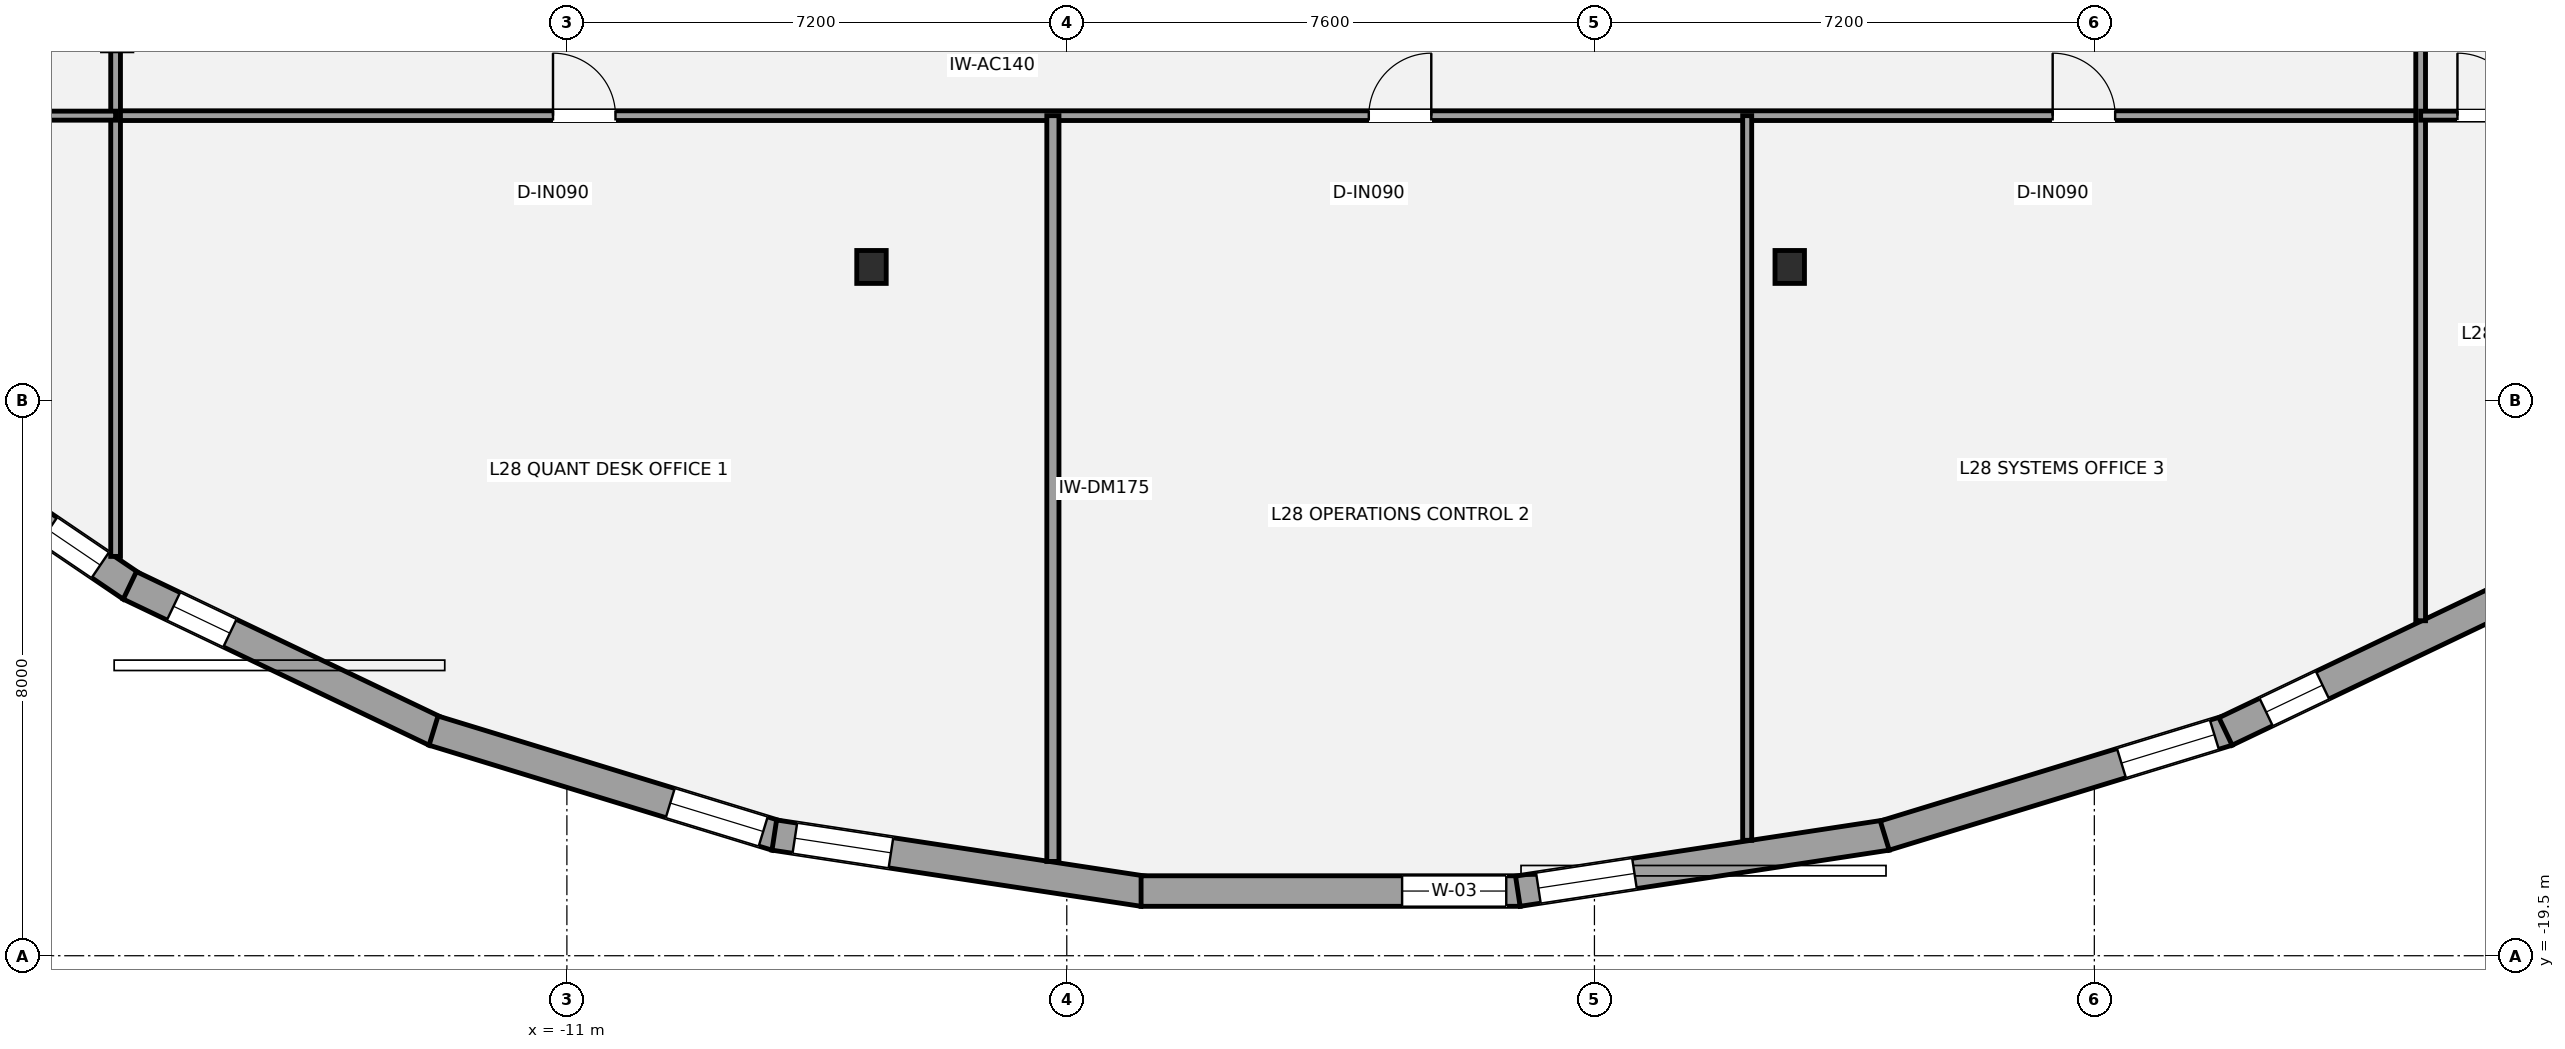
"""IFC4 building model, lengths in metres.
Left out: names, types, materials, properties, quantities, classifications, styles, units other than length and angle.
Written with IfcOpenShell. Run it as: python <this file> out.ifc"""

import sys

from ifc_helpers import new_model, si_unit, direction, frame, frame_2d, origin, origin_2d, place, context, subcontext, project, spatial, rectangle, i_section, extrude, element, fill, save


model = new_model("IFC4")
c1 = context("Model", 3, precision=1e-05, world=origin(), true_north=direction((0.0, 1.0)))
c2 = subcontext(c1, "Body", "Model", "MODEL_VIEW")
j1 = project(units=[si_unit("LENGTHUNIT", "METRE"), si_unit("PLANEANGLEUNIT", "RADIAN")], contexts=[c1])
p1 = place(None, origin())
s1 = spatial("IfcSite", under=j1, at=p1, CompositionType="ELEMENT")
p2 = place(p1, origin())
s2 = spatial("IfcBuilding", under=s1, at=p2, CompositionType="ELEMENT")
p3 = place(p2, frame((0.0, 0.0, 107.1)))
s3 = spatial("IfcBuildingStorey", under=s2, at=p3, CompositionType="ELEMENT", Elevation=107.1)
for number, where, z_axis, x_axis in (
    (1, (-6.613, -9.579, 0.0), (0.0, 0.0, 1.0), (1.0, 0.0, 0.0)),
    (2, (6.613, -9.579, 0.0), (0.0, 0.0, 1.0), (1.0, 0.0, 0.0)),
):
    element("IfcColumn", number, at=place(p3, frame(where, z_axis=z_axis, x_axis=x_axis)), inside=s3, PredefinedType="COLUMN", context=c2, shape_type="SweptSolid", body=[
        extrude(i_section(OverallWidth=0.424, OverallDepth=0.474, WebThickness=0.048, FlangeThickness=0.077, at=origin_2d()), origin(), (0.0, 0.0, 1.0), 3.5),
    ])
p4 = place(p3, frame((-17.266, -14.182, 0.0), z_axis=(0.0, 0.0, 1.0), x_axis=(-0.827754551165, 0.56109036975, 0.0)))
e3 = element("IfcWall", 3, at=p4, inside=s3, PredefinedType="STANDARD", context=c2, shape_type="SweptSolid", body=[
    extrude(rectangle(XDim=4.591, YDim=0.44, at=frame_2d((2.295, 0.0))), origin(), (0.0, 0.0, 1.0), 2.528),
])
p5 = place(p4, frame((0.549, 0.0, 0.58)))
e4 = element("IfcOpeningElement", 4, at=p5, cuts=e3, PredefinedType="OPENING", context=c2, shape_type="SweptSolid", body=[
    extrude(rectangle(XDim=0.9, YDim=1.35, at=frame_2d((0.45, 0.675))), frame((0.0, 0.23, 0.0), z_axis=(0.0, -1.0, 0.0), x_axis=(1.0, 0.0, 0.0)), (0.0, 0.0, 1.0), 0.46),
])
p6 = place(p3, frame((-12.89, -16.27, 0.0), z_axis=(0.0, 0.0, 1.0), x_axis=(-0.902372757907, 0.430956385018, 0.0)))
e5 = element("IfcWall", 5, at=p6, inside=s3, PredefinedType="STANDARD", context=c2, shape_type="SweptSolid", body=[
    extrude(rectangle(XDim=4.882, YDim=0.44, at=frame_2d((2.441, 0.0))), origin(), (0.0, 0.0, 1.0), 2.528),
])
p7 = place(p6, frame((3.284, 0.0, 0.58)))
e6 = element("IfcOpeningElement", 6, at=p7, cuts=e5, PredefinedType="OPENING", context=c2, shape_type="SweptSolid", body=[
    extrude(rectangle(XDim=0.9, YDim=1.35, at=frame_2d((0.45, 0.675))), frame((0.0, 0.23, 0.0), z_axis=(0.0, -1.0, 0.0), x_axis=(1.0, 0.0, 0.0)), (0.0, 0.0, 1.0), 0.46),
])
p8 = place(p3, frame((-7.981, -17.769, 0.0), z_axis=(0.0, 0.0, 1.0), x_axis=(-0.956228569431, 0.292620783617, 0.0)))
e7 = element("IfcWall", 7, at=p8, inside=s3, PredefinedType="STANDARD", context=c2, shape_type="SweptSolid", body=[
    extrude(rectangle(XDim=5.165, YDim=0.44, at=frame_2d((2.583, 0.0))), origin(), (0.0, 0.0, 1.0), 2.528),
])
p9 = place(p8, frame((0.2, 0.0, 0.58)))
e8 = element("IfcOpeningElement", 8, at=p9, cuts=e7, PredefinedType="OPENING", context=c2, shape_type="SweptSolid", body=[
    extrude(rectangle(XDim=1.4, YDim=1.55, at=frame_2d((0.7, 0.775))), frame((0.0, 0.23, 0.0), z_axis=(0.0, -1.0, 0.0), x_axis=(1.0, 0.0, 0.0)), (0.0, 0.0, 1.0), 0.46),
])
p10 = place(p3, frame((-2.697, -18.571, 0.0), z_axis=(0.0, 0.0, 1.0), x_axis=(-0.988627497469, 0.150385076545, 0.0)))
e9 = element("IfcWall", 9, at=p10, inside=s3, PredefinedType="STANDARD", context=c2, shape_type="SweptSolid", body=[
    extrude(rectangle(XDim=5.377, YDim=0.44, at=frame_2d((2.688, 0.0))), origin(), (0.0, 0.0, 1.0), 2.528),
])
p11 = place(p10, frame((3.677, 0.0, 0.58)))
e10 = element("IfcOpeningElement", 10, at=p11, cuts=e9, PredefinedType="OPENING", context=c2, shape_type="SweptSolid", body=[
    extrude(rectangle(XDim=1.4, YDim=1.55, at=frame_2d((0.7, 0.775))), frame((0.0, 0.23, 0.0), z_axis=(0.0, -1.0, 0.0), x_axis=(1.0, 0.0, 0.0)), (0.0, 0.0, 1.0), 0.46),
])
p12 = place(p3, frame((2.73, -18.568, 0.0), z_axis=(0.0, 0.0, 1.0), x_axis=(-1.0, 0.0, 0.0)))
e11 = element("IfcWall", 11, at=p12, inside=s3, PredefinedType="STANDARD", context=c2, shape_type="SweptSolid", body=[
    extrude(rectangle(XDim=5.459, YDim=0.44, at=frame_2d((2.73, 0.0))), origin(), (0.0, 0.0, 1.0), 2.528),
])
p13 = place(p12, frame((0.2, 0.0, 0.48)))
e12 = element("IfcOpeningElement", 12, at=p13, cuts=e11, PredefinedType="OPENING", context=c2, shape_type="SweptSolid", body=[
    extrude(rectangle(XDim=1.5, YDim=1.7, at=frame_2d((0.75, 0.85))), frame((0.0, 0.23, 0.0), z_axis=(0.0, -1.0, 0.0), x_axis=(1.0, 0.0, 0.0)), (0.0, 0.0, 1.0), 0.46),
])
p14 = place(p3, frame((8.012, -17.762, 0.0), z_axis=(0.0, 0.0, 1.0), x_axis=(-0.988627497469, -0.150385076545, 0.0)))
e13 = element("IfcWall", 13, at=p14, inside=s3, PredefinedType="STANDARD", context=c2, shape_type="SweptSolid", body=[
    extrude(rectangle(XDim=5.377, YDim=0.44, at=frame_2d((2.688, 0.0))), origin(), (0.0, 0.0, 1.0), 2.528),
])
p15 = place(p14, frame((3.677, 0.0, 0.58)))
e14 = element("IfcOpeningElement", 14, at=p15, cuts=e13, PredefinedType="OPENING", context=c2, shape_type="SweptSolid", body=[
    extrude(rectangle(XDim=1.4, YDim=1.55, at=frame_2d((0.7, 0.775))), frame((0.0, 0.23, 0.0), z_axis=(0.0, -1.0, 0.0), x_axis=(1.0, 0.0, 0.0)), (0.0, 0.0, 1.0), 0.46),
])
p16 = place(p3, frame((12.92, -16.258, 0.0), z_axis=(0.0, 0.0, 1.0), x_axis=(-0.956228569431, -0.292620783617, 0.0)))
e15 = element("IfcWall", 15, at=p16, inside=s3, PredefinedType="STANDARD", context=c2, shape_type="SweptSolid", body=[
    extrude(rectangle(XDim=5.165, YDim=0.44, at=frame_2d((2.583, 0.0))), origin(), (0.0, 0.0, 1.0), 2.528),
])
p17 = place(p16, frame((0.2, 0.0, 0.58)))
e16 = element("IfcOpeningElement", 16, at=p17, cuts=e15, PredefinedType="OPENING", context=c2, shape_type="SweptSolid", body=[
    extrude(rectangle(XDim=1.4, YDim=1.55, at=frame_2d((0.7, 0.775))), frame((0.0, 0.23, 0.0), z_axis=(0.0, -1.0, 0.0), x_axis=(1.0, 0.0, 0.0)), (0.0, 0.0, 1.0), 0.46),
])
p18 = place(p3, frame((17.295, -14.166, 0.0), z_axis=(0.0, 0.0, 1.0), x_axis=(-0.902372757907, -0.430956385018, 0.0)))
e17 = element("IfcWall", 17, at=p18, inside=s3, PredefinedType="STANDARD", context=c2, shape_type="SweptSolid", body=[
    extrude(rectangle(XDim=4.882, YDim=0.44, at=frame_2d((2.441, 0.0))), origin(), (0.0, 0.0, 1.0), 2.528),
])
p19 = place(p18, frame((3.334, 0.0, 0.58)))
e18 = element("IfcOpeningElement", 18, at=p19, cuts=e17, PredefinedType="OPENING", context=c2, shape_type="SweptSolid", body=[
    extrude(rectangle(XDim=0.9, YDim=1.35, at=frame_2d((0.45, 0.675))), frame((0.0, 0.23, 0.0), z_axis=(0.0, -1.0, 0.0), x_axis=(1.0, 0.0, 0.0)), (0.0, 0.0, 1.0), 0.46),
])
p20 = place(p3, frame((-17.5, -7.4, 0.0), z_axis=(0.0, 0.0, 1.0), x_axis=(1.0, 0.0, 0.0)))
e19 = element("IfcWall", 19, at=p20, inside=s3, PredefinedType="PARTITIONING", context=c2, shape_type="SweptSolid", body=[
    extrude(rectangle(XDim=33.2, YDim=0.14, at=frame_2d((16.6, 0.0))), origin(), (0.0, 0.0, 1.0), 2.688),
])
p21 = place(p20, frame((6.3, 0.0, 0.0)))
e20 = element("IfcOpeningElement", 20, at=p21, cuts=e19, PredefinedType="OPENING", context=c2, shape_type="SweptSolid", body=[
    extrude(rectangle(XDim=0.9, YDim=2.1, at=frame_2d((0.45, 1.05))), frame((0.0, 0.08, 0.0), z_axis=(0.0, -1.0, 0.0), x_axis=(1.0, 0.0, 0.0)), (0.0, 0.0, 1.0), 0.16),
])
p22 = place(p20, frame((18.05, 0.0, 0.0)))
e21 = element("IfcOpeningElement", 21, at=p22, cuts=e19, PredefinedType="OPENING", context=c2, shape_type="SweptSolid", body=[
    extrude(rectangle(XDim=0.9, YDim=2.1, at=frame_2d((0.45, 1.05))), frame((0.0, 0.08, 0.0), z_axis=(0.0, -1.0, 0.0), x_axis=(1.0, 0.0, 0.0)), (0.0, 0.0, 1.0), 0.16),
])
p23 = place(p20, frame((27.9, 0.0, 0.0)))
e22 = element("IfcOpeningElement", 22, at=p23, cuts=e19, PredefinedType="OPENING", context=c2, shape_type="SweptSolid", body=[
    extrude(rectangle(XDim=0.9, YDim=2.1, at=frame_2d((0.45, 1.05))), frame((0.0, 0.08, 0.0), z_axis=(0.0, -1.0, 0.0), x_axis=(1.0, 0.0, 0.0)), (0.0, 0.0, 1.0), 0.16),
])
p24 = place(p3, frame((-17.5, -13.748, 0.0), z_axis=(0.0, 0.0, 1.0), x_axis=(0.0, 1.0, 0.0)))
e23 = element("IfcWall", 23, at=p24, inside=s3, PredefinedType="PARTITIONING", context=c2, shape_type="SweptSolid", body=[
    extrude(rectangle(XDim=21.298, YDim=0.14, at=frame_2d((10.649, 0.0))), origin(), (0.0, 0.0, 1.0), 2.688),
])
p25 = place(p24, frame((10.499, 0.0, 0.0)))
e24 = element("IfcOpeningElement", 24, at=p25, cuts=e23, PredefinedType="OPENING", context=c2, shape_type="SweptSolid", body=[
    extrude(rectangle(XDim=0.9, YDim=2.1, at=frame_2d((0.45, 1.05))), frame((0.0, 0.08, 0.0), z_axis=(0.0, -1.0, 0.0), x_axis=(1.0, 0.0, 0.0)), (0.0, 0.0, 1.0), 0.16),
])
p26 = place(p24, frame((17.974, 0.0, 0.0)))
e25 = element("IfcOpeningElement", 25, at=p26, cuts=e23, PredefinedType="OPENING", context=c2, shape_type="SweptSolid", body=[
    extrude(rectangle(XDim=0.9, YDim=2.1, at=frame_2d((0.45, 1.05))), frame((0.0, 0.08, 0.0), z_axis=(0.0, -1.0, 0.0), x_axis=(1.0, 0.0, 0.0)), (0.0, 0.0, 1.0), 0.16),
])
p27 = place(p3, frame((15.7, -14.675, 0.0), z_axis=(0.0, 0.0, 1.0), x_axis=(0.0, 1.0, 0.0)))
e26 = element("IfcWall", 26, at=p27, inside=s3, PredefinedType="PARTITIONING", context=c2, shape_type="SweptSolid", body=[
    extrude(rectangle(XDim=22.225, YDim=0.14, at=frame_2d((11.112, 0.0))), origin(), (0.0, 0.0, 1.0), 2.763),
])
p28 = place(p27, frame((9.325, 0.0, 0.0)))
e27 = element("IfcOpeningElement", 27, at=p28, cuts=e26, PredefinedType="OPENING", context=c2, shape_type="SweptSolid", body=[
    extrude(rectangle(XDim=0.9, YDim=2.1, at=frame_2d((0.45, 1.05))), frame((0.0, 0.08, 0.0), z_axis=(0.0, -1.0, 0.0), x_axis=(1.0, 0.0, 0.0)), (0.0, 0.0, 1.0), 0.16),
])
p29 = place(p27, frame((13.525, 0.0, 0.0)))
e28 = element("IfcOpeningElement", 28, at=p29, cuts=e26, PredefinedType="OPENING", context=c2, shape_type="SweptSolid", body=[
    extrude(rectangle(XDim=0.9, YDim=2.1, at=frame_2d((0.45, 1.05))), frame((0.0, 0.08, 0.0), z_axis=(0.0, -1.0, 0.0), x_axis=(1.0, 0.0, 0.0)), (0.0, 0.0, 1.0), 0.16),
])
p30 = place(p27, frame((16.925, 0.0, 0.0)))
e29 = element("IfcOpeningElement", 29, at=p30, cuts=e26, PredefinedType="OPENING", context=c2, shape_type="SweptSolid", body=[
    extrude(rectangle(XDim=0.9, YDim=2.1, at=frame_2d((0.45, 1.05))), frame((0.0, 0.08, 0.0), z_axis=(0.0, -1.0, 0.0), x_axis=(1.0, 0.0, 0.0)), (0.0, 0.0, 1.0), 0.16),
])
p31 = place(p27, frame((20.2, 0.0, 0.0)))
e30 = element("IfcOpeningElement", 30, at=p31, cuts=e26, PredefinedType="OPENING", context=c2, shape_type="SweptSolid", body=[
    extrude(rectangle(XDim=0.9, YDim=2.1, at=frame_2d((0.45, 1.05))), frame((0.0, 0.08, 0.0), z_axis=(0.0, -1.0, 0.0), x_axis=(1.0, 0.0, 0.0)), (0.0, 0.0, 1.0), 0.16),
])
p32 = place(p3, frame((-4.0, -18.142, 0.0), z_axis=(0.0, 0.0, 1.0), x_axis=(0.0, 1.0, 0.0)))
e31 = element("IfcWall", 31, at=p32, inside=s3, PredefinedType="PARTITIONING", context=c2, shape_type="SweptSolid", body=[
    extrude(rectangle(XDim=10.742, YDim=0.175, at=frame_2d((5.371, 0.0))), origin(), (0.0, 0.0, 1.0), 2.763),
])
p33 = place(p3, frame((6.0, -17.838, 0.0), z_axis=(0.0, 0.0, 1.0), x_axis=(0.0, 1.0, 0.0)))
e32 = element("IfcWall", 32, at=p33, inside=s3, PredefinedType="PARTITIONING", context=c2, shape_type="SweptSolid", body=[
    extrude(rectangle(XDim=10.438, YDim=0.13, at=frame_2d((5.219, 0.0))), origin(), (0.0, 0.0, 1.0), 2.763),
])
p34 = place(p3, frame((-24.689, -7.4, 0.0), z_axis=(0.0, 0.0, 1.0), x_axis=(1.0, 0.0, 0.0)))
e33 = element("IfcWall", 33, at=p34, inside=s3, PredefinedType="PARTITIONING", context=c2, shape_type="SweptSolid", body=[
    extrude(rectangle(XDim=7.189, YDim=0.13, at=frame_2d((3.594, 0.0))), origin(), (0.0, 0.0, 1.0), 2.763),
])
p35 = place(p34, frame((0.99, 0.0, 0.0)))
e34 = element("IfcOpeningElement", 34, at=p35, cuts=e33, PredefinedType="OPENING", context=c2, shape_type="SweptSolid", body=[
    extrude(rectangle(XDim=0.9, YDim=2.1, at=frame_2d((0.45, 1.05))), frame((0.0, 0.075, 0.0), z_axis=(0.0, -1.0, 0.0), x_axis=(1.0, 0.0, 0.0)), (0.0, 0.0, 1.0), 0.15),
])
p36 = place(p3, frame((15.7, -7.4, 0.0), z_axis=(0.0, 0.0, 1.0), x_axis=(1.0, 0.0, 0.0)))
e35 = element("IfcWall", 35, at=p36, inside=s3, PredefinedType="PARTITIONING", context=c2, shape_type="SweptSolid", body=[
    extrude(rectangle(XDim=8.989, YDim=0.13, at=frame_2d((4.494, 0.0))), origin(), (0.0, 0.0, 1.0), 2.763),
])
p37 = place(p36, frame((0.53, 0.0, 0.0)))
e36 = element("IfcOpeningElement", 36, at=p37, cuts=e35, PredefinedType="OPENING", context=c2, shape_type="SweptSolid", body=[
    extrude(rectangle(XDim=0.9, YDim=2.1, at=frame_2d((0.45, 1.05))), frame((0.0, 0.075, 0.0), z_axis=(0.0, -1.0, 0.0), x_axis=(1.0, 0.0, 0.0)), (0.0, 0.0, 1.0), 0.15),
])
p38 = place(p5, origin())
e37 = element("IfcWindow", 37, at=p38, inside=s3, PartitioningType="SINGLE_PANEL", PredefinedType="WINDOW", context=c2, shape_type="SweptSolid", body=[
    extrude(rectangle(XDim=0.9, YDim=1.35, at=frame_2d((0.45, 0.675))), frame((0.0, -0.01, 0.0), z_axis=(0.0, -1.0, 0.0), x_axis=(1.0, 0.0, 0.0)), (0.0, 0.0, 1.0), 0.06),
])
fill(e4, e37)
p39 = place(p7, origin())
e38 = element("IfcWindow", 38, at=p39, inside=s3, PartitioningType="SINGLE_PANEL", PredefinedType="WINDOW", context=c2, shape_type="SweptSolid", body=[
    extrude(rectangle(XDim=0.9, YDim=1.35, at=frame_2d((0.45, 0.675))), frame((0.0, -0.01, 0.0), z_axis=(0.0, -1.0, 0.0), x_axis=(1.0, 0.0, 0.0)), (0.0, 0.0, 1.0), 0.06),
])
fill(e6, e38)
p40 = place(p9, origin())
e39 = element("IfcWindow", 39, at=p40, inside=s3, PartitioningType="SINGLE_PANEL", PredefinedType="WINDOW", context=c2, shape_type="SweptSolid", body=[
    extrude(rectangle(XDim=1.4, YDim=1.55, at=frame_2d((0.7, 0.775))), frame((0.0, -0.01, 0.0), z_axis=(0.0, -1.0, 0.0), x_axis=(1.0, 0.0, 0.0)), (0.0, 0.0, 1.0), 0.06),
])
fill(e8, e39)
p41 = place(p11, origin())
e40 = element("IfcWindow", 40, at=p41, inside=s3, PartitioningType="SINGLE_PANEL", PredefinedType="WINDOW", context=c2, shape_type="SweptSolid", body=[
    extrude(rectangle(XDim=1.4, YDim=1.55, at=frame_2d((0.7, 0.775))), frame((0.0, -0.01, 0.0), z_axis=(0.0, -1.0, 0.0), x_axis=(1.0, 0.0, 0.0)), (0.0, 0.0, 1.0), 0.06),
])
fill(e10, e40)
p42 = place(p13, origin())
e41 = element("IfcWindow", 41, at=p42, inside=s3, PartitioningType="SINGLE_PANEL", PredefinedType="WINDOW", context=c2, shape_type="SweptSolid", body=[
    extrude(rectangle(XDim=1.5, YDim=1.7, at=frame_2d((0.75, 0.85))), frame((0.0, -0.01, 0.0), z_axis=(0.0, -1.0, 0.0), x_axis=(1.0, 0.0, 0.0)), (0.0, 0.0, 1.0), 0.06),
])
fill(e12, e41)
p43 = place(p15, origin())
e42 = element("IfcWindow", 42, at=p43, inside=s3, PartitioningType="SINGLE_PANEL", PredefinedType="WINDOW", context=c2, shape_type="SweptSolid", body=[
    extrude(rectangle(XDim=1.4, YDim=1.55, at=frame_2d((0.7, 0.775))), frame((0.0, -0.01, 0.0), z_axis=(0.0, -1.0, 0.0), x_axis=(1.0, 0.0, 0.0)), (0.0, 0.0, 1.0), 0.06),
])
fill(e14, e42)
p44 = place(p17, origin())
e43 = element("IfcWindow", 43, at=p44, inside=s3, PartitioningType="SINGLE_PANEL", PredefinedType="WINDOW", context=c2, shape_type="SweptSolid", body=[
    extrude(rectangle(XDim=1.4, YDim=1.55, at=frame_2d((0.7, 0.775))), frame((0.0, -0.01, 0.0), z_axis=(0.0, -1.0, 0.0), x_axis=(1.0, 0.0, 0.0)), (0.0, 0.0, 1.0), 0.06),
])
fill(e16, e43)
p45 = place(p19, origin())
e44 = element("IfcWindow", 44, at=p45, inside=s3, PartitioningType="SINGLE_PANEL", PredefinedType="WINDOW", context=c2, shape_type="SweptSolid", body=[
    extrude(rectangle(XDim=0.9, YDim=1.35, at=frame_2d((0.45, 0.675))), frame((0.0, -0.01, 0.0), z_axis=(0.0, -1.0, 0.0), x_axis=(1.0, 0.0, 0.0)), (0.0, 0.0, 1.0), 0.06),
])
fill(e18, e44)
p46 = place(p21, origin())
e45 = element("IfcDoor", 45, at=p46, inside=s3, OperationType="SINGLE_SWING_LEFT", PredefinedType="DOOR", context=c2, shape_type="SweptSolid", body=[
    extrude(rectangle(XDim=0.9, YDim=2.1, at=frame_2d((0.45, 1.05))), frame((0.0, 0.025, 0.0), z_axis=(0.0, -1.0, 0.0), x_axis=(1.0, 0.0, 0.0)), (0.0, 0.0, 1.0), 0.05),
])
fill(e20, e45)
p47 = place(p22, origin())
e46 = element("IfcDoor", 46, at=p47, inside=s3, OperationType="SINGLE_SWING_RIGHT", PredefinedType="DOOR", context=c2, shape_type="SweptSolid", body=[
    extrude(rectangle(XDim=0.9, YDim=2.1, at=frame_2d((0.45, 1.05))), frame((0.0, 0.025, 0.0), z_axis=(0.0, -1.0, 0.0), x_axis=(1.0, 0.0, 0.0)), (0.0, 0.0, 1.0), 0.05),
])
fill(e21, e46)
p48 = place(p23, origin())
e47 = element("IfcDoor", 47, at=p48, inside=s3, OperationType="SINGLE_SWING_LEFT", PredefinedType="DOOR", context=c2, shape_type="SweptSolid", body=[
    extrude(rectangle(XDim=0.9, YDim=2.1, at=frame_2d((0.45, 1.05))), frame((0.0, 0.025, 0.0), z_axis=(0.0, -1.0, 0.0), x_axis=(1.0, 0.0, 0.0)), (0.0, 0.0, 1.0), 0.05),
])
fill(e22, e47)
p49 = place(p37, origin())
e48 = element("IfcDoor", 48, at=p49, inside=s3, OperationType="SINGLE_SWING_LEFT", PredefinedType="DOOR", context=c2, shape_type="SweptSolid", body=[
    extrude(rectangle(XDim=0.9, YDim=2.1, at=frame_2d((0.45, 1.05))), frame((0.0, 0.025, 0.0), z_axis=(0.0, -1.0, 0.0), x_axis=(1.0, 0.0, 0.0)), (0.0, 0.0, 1.0), 0.05),
])
fill(e36, e48)
save(model, sys.argv[1])
